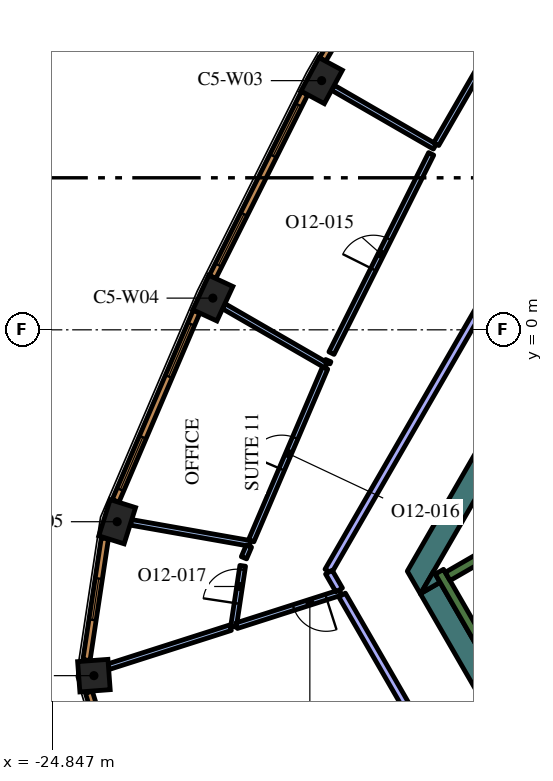
"""IFC4 building model, lengths in metres.
Left out: names, types, materials, properties, quantities, classifications, styles, units other than length and angle.
Written with IfcOpenShell. Run it as: python <this file> out.ifc"""

import sys

from ifc_helpers import new_model, si_unit, direction, frame, frame_2d, origin, origin_2d, place, context, subcontext, project, spatial, polyline, rectangle, outline, extrude, element, fill, save


model = new_model("IFC4")
c1 = context("Model", 3, precision=1e-05, world=origin(), true_north=direction((0.0, 1.0)))
c2 = subcontext(c1, "Body", "Model", "MODEL_VIEW")
j1 = project(units=[si_unit("LENGTHUNIT", "METRE"), si_unit("PLANEANGLEUNIT", "RADIAN")], contexts=[c1])
p1 = place(None, origin())
s1 = spatial("IfcSite", under=j1, at=p1, CompositionType="ELEMENT")
p2 = place(p1, origin())
s2 = spatial("IfcBuilding", under=s1, at=p2, CompositionType="ELEMENT")
p3 = place(p2, frame((0.0, 0.0, 283.8)))
s3 = spatial("IfcBuildingStorey", under=s2, at=p3, CompositionType="ELEMENT", Elevation=283.8)
for number, where, z_axis, x_axis in (
    (1, (-17.756, 6.557, 0.0), (0.0, 0.0, 1.0), (-0.474, -0.881, 0.0)),
    (2, (-20.619, 0.834, 0.0), (0.0, 0.0, 1.0), (-0.421, -0.907, 0.0)),
    (3, (-23.136, -5.049, 0.0), (0.0, 0.0, 1.0), (-0.3, -0.954, 0.0)),
):
    element("IfcColumn", number, at=place(p3, frame(where, z_axis=z_axis, x_axis=x_axis)), inside=s3, PredefinedType="COLUMN", context=c2, shape_type="SweptSolid", body=[
        extrude(rectangle(XDim=1.0, YDim=0.7, at=origin_2d()), origin(), (0.0, 0.0, 1.0), 4.2),
    ])
p4 = place(p3, frame((-23.748, -9.1, 0.0), z_axis=(0.0, 0.0, 1.0), x_axis=(0.074510546573, -0.997220225652, 0.0)))
e4 = element("IfcColumn", 4, at=p4, inside=s3, PredefinedType="COLUMN", context=c2, shape_type="SweptSolid", body=[
    extrude(rectangle(XDim=0.8, YDim=0.8, at=origin_2d()), origin(), (0.0, 0.0, 1.0), 4.2),
])
p5 = place(p3, origin())
e5 = element("IfcWall", 5, at=p5, inside=s3, PredefinedType="SOLIDWALL", context=c2, shape_type="SweptSolid", body=[
    extrude(outline(polyline([(-15.502, -6.35), (-4.912, 11.992), (-4.393, 11.692), (-10.815, 0.569), (-10.84, 0.583), (-10.84, 0.583), (-10.84, 0.583), (-10.965, 0.367), (-10.965, 0.367), (-10.965, 0.367), (-10.94, 0.352), (-11.033, 0.191), (-14.809, -6.35), (-15.156, -6.95), (-15.502, -6.35)])), origin(), (0.0, 0.0, 1.0), 4.2),
])
p6 = place(p3, frame((-14.899, -6.795, 0.0), z_axis=(0.0, 0.0, 1.0), x_axis=(0.499950938802, -0.866053727428, 0.0)))
e6 = element("IfcWall", 6, at=p6, inside=s3, PredefinedType="SOLIDWALL", context=c2, shape_type="SweptSolid", body=[
    extrude(rectangle(XDim=3.823, YDim=0.6, at=frame_2d((1.912, 0.0))), origin(), (0.0, 0.0, 1.0), 4.2),
])
e7 = element("IfcWall", 7, at=p5, inside=s3, PredefinedType="SOLIDWALL", context=c2, shape_type="SweptSolid", body=[
    extrude(outline(polyline([(-14.64, -6.643), (-15.147, -6.936), (-14.809, -6.35), (-14.64, -6.643)])), origin(), (0.0, 0.0, 1.0), 4.2),
])
p7 = place(p3, frame((-12.84, -9.511, 0.0), z_axis=(0.0, 0.0, 1.0), x_axis=(-0.499997733992, 0.866026712061, 0.0)))
e8 = element("IfcWall", 8, at=p7, inside=s3, PredefinedType="SOLIDWALL", context=c2, shape_type="SweptSolid", body=[
    extrude(rectangle(XDim=3.634, YDim=0.25, at=frame_2d((1.817, 0.0))), origin(), (0.0, 0.0, 1.0), 4.2),
])
p8 = place(p3, frame((-14.44, -6.49, 0.0), z_axis=(0.0, 0.0, 1.0), x_axis=(0.866022966069, 0.500004222222, 0.0)))
e9 = element("IfcWall", 9, at=p8, inside=s3, PredefinedType="SOLIDWALL", context=c2, shape_type="SweptSolid", body=[
    extrude(rectangle(XDim=6.8, YDim=0.25, at=frame_2d((3.4, 0.0))), origin(), (0.0, 0.0, 1.0), 4.2),
])
p9 = place(p3, frame((-14.777, 4.822, 0.0), z_axis=(0.0, 0.0, 1.0), x_axis=(-0.865992557167, 0.500056887695, 0.0)))
e10 = element("IfcWall", 10, at=p9, inside=s3, PredefinedType="PARTITIONING", context=c2, shape_type="SweptSolid", body=[
    extrude(rectangle(XDim=3.096, YDim=0.15, at=frame_2d((1.548, 0.0))), origin(), (0.0, 0.0, 1.0), 3.55),
])
p10 = place(p3, frame((-14.74, 4.887, 0.0), z_axis=(0.0, 0.0, 1.0), x_axis=(0.500007141444, 0.86602128063, 0.0)))
e11 = element("IfcWall", 11, at=p10, inside=s3, PredefinedType="PARTITIONING", context=c2, shape_type="SweptSolid", body=[
    extrude(rectangle(XDim=6.137, YDim=0.15, at=frame_2d((3.068, 0.0))), origin(), (0.0, 0.0, 1.0), 3.55),
])
p11 = place(p10, frame((2.637, 0.0, 0.0)))
e12 = element("IfcOpeningElement", 12, at=p11, cuts=e11, PredefinedType="OPENING", context=c2, shape_type="SweptSolid", body=[
    extrude(rectangle(XDim=0.9, YDim=2.1, at=frame_2d((0.45, 1.05))), frame((0.0, 0.085, 0.0), z_axis=(0.0, -1.0, 0.0), x_axis=(1.0, 0.0, 0.0)), (0.0, 0.0, 1.0), 0.17),
])
p12 = place(p3, frame((-17.635, -0.936, 0.0), z_axis=(0.0, 0.0, 1.0), x_axis=(-0.866044607523, 0.499966736674, 0.0)))
e13 = element("IfcWall", 13, at=p12, inside=s3, PredefinedType="PARTITIONING", context=c2, shape_type="SweptSolid", body=[
    extrude(rectangle(XDim=3.115, YDim=0.15, at=frame_2d((1.557, 0.0))), origin(), (0.0, 0.0, 1.0), 3.55),
])
p13 = place(p3, frame((-17.497, -0.613, 0.0), z_axis=(0.0, 0.0, 1.0), x_axis=(0.447480081559, 0.89429389834, 0.0)))
e14 = element("IfcWall", 14, at=p13, inside=s3, PredefinedType="PARTITIONING", context=c2, shape_type="SweptSolid", body=[
    extrude(rectangle(XDim=5.863, YDim=0.15, at=frame_2d((2.931, 0.0))), origin(), (0.0, 0.0, 1.0), 3.55),
])
p14 = place(p13, frame((2.463, 0.0, 0.0)))
e15 = element("IfcOpeningElement", 15, at=p14, cuts=e14, PredefinedType="OPENING", context=c2, shape_type="SweptSolid", body=[
    extrude(rectangle(XDim=0.9, YDim=2.1, at=frame_2d((0.45, 1.05))), frame((0.0, 0.085, 0.0), z_axis=(0.0, -1.0, 0.0), x_axis=(1.0, 0.0, 0.0)), (0.0, 0.0, 1.0), 0.17),
])
p15 = place(p3, frame((-17.581, -0.81, 0.0), z_axis=(0.0, 0.0, 1.0), x_axis=(-0.390033474923, -0.92080067791, 0.0)))
e16 = element("IfcWall", 16, at=p15, inside=s3, PredefinedType="PARTITIONING", context=c2, shape_type="SweptSolid", body=[
    extrude(rectangle(XDim=0.061, YDim=0.15, at=frame_2d((0.03, 0.0))), origin(), (0.0, 0.0, 1.0), 3.55),
])
p16 = place(p3, frame((-19.639, -5.62, 0.0), z_axis=(0.0, 0.0, 1.0), x_axis=(-0.984765028635, 0.173890305586, 0.0)))
e17 = element("IfcWall", 17, at=p16, inside=s3, PredefinedType="PARTITIONING", context=c2, shape_type="SweptSolid", body=[
    extrude(rectangle(XDim=3.184, YDim=0.15, at=frame_2d((1.592, 0.0))), origin(), (0.0, 0.0, 1.0), 3.55),
])
p17 = place(p3, frame((-19.608, -5.549, 0.0), z_axis=(0.0, 0.0, 1.0), x_axis=(0.393352855097, 0.919387584964, 0.0)))
e18 = element("IfcWall", 18, at=p17, inside=s3, PredefinedType="PARTITIONING", context=c2, shape_type="SweptSolid", body=[
    extrude(rectangle(XDim=4.942, YDim=0.15, at=frame_2d((2.471, 0.0))), origin(), (0.0, 0.0, 1.0), 3.55),
])
p18 = place(p17, frame((2.042, 0.0, 0.0)))
e19 = element("IfcOpeningElement", 19, at=p18, cuts=e18, PredefinedType="OPENING", context=c2, shape_type="SweptSolid", body=[
    extrude(rectangle(XDim=0.9, YDim=2.1, at=frame_2d((0.45, 1.05))), frame((0.0, 0.085, 0.0), z_axis=(0.0, -1.0, 0.0), x_axis=(1.0, 0.0, 0.0)), (0.0, 0.0, 1.0), 0.17),
])
p19 = place(p3, frame((-19.669, -5.69, 0.0), z_axis=(0.0, 0.0, 1.0), x_axis=(-0.393566769146, -0.919296034052, 0.0)))
e20 = element("IfcWall", 20, at=p19, inside=s3, PredefinedType="PARTITIONING", context=c2, shape_type="SweptSolid", body=[
    extrude(rectangle(XDim=0.334, YDim=0.15, at=frame_2d((0.167, 0.0))), origin(), (0.0, 0.0, 1.0), 3.55),
])
p20 = place(p3, frame((-20.074, -7.812, 0.0), z_axis=(0.0, 0.0, 1.0), x_axis=(0.149305499664, 0.988791114326, 0.0)))
e21 = element("IfcWall", 21, at=p20, inside=s3, PredefinedType="PARTITIONING", context=c2, shape_type="SweptSolid", body=[
    extrude(rectangle(XDim=1.62, YDim=0.15, at=frame_2d((0.81, 0.0))), origin(), (0.0, 0.0, 1.0), 3.55),
])
p21 = place(p20, frame((0.621, 0.0, 0.0)))
e22 = element("IfcOpeningElement", 22, at=p21, cuts=e21, PredefinedType="OPENING", context=c2, shape_type="SweptSolid", body=[
    extrude(rectangle(XDim=0.9, YDim=2.1, at=frame_2d((0.45, 1.05))), frame((0.0, 0.085, 0.0), z_axis=(0.0, -1.0, 0.0), x_axis=(1.0, 0.0, 0.0)), (0.0, 0.0, 1.0), 0.17),
])
p22 = place(p3, frame((-20.154, -7.838, 0.0), z_axis=(0.0, 0.0, 1.0), x_axis=(-0.952501497002, -0.304533903217, 0.0)))
e23 = element("IfcWall", 23, at=p22, inside=s3, PredefinedType="PARTITIONING", context=c2, shape_type="SweptSolid", body=[
    extrude(rectangle(XDim=3.37, YDim=0.15, at=frame_2d((1.685, 0.0))), origin(), (0.0, 0.0, 1.0), 3.55),
])
p23 = place(p3, frame((-17.256, -6.911, 0.0), z_axis=(0.0, 0.0, 1.0), x_axis=(-0.95247639241, -0.304612412587, 0.0)))
e24 = element("IfcWall", 24, at=p23, inside=s3, PredefinedType="PARTITIONING", context=c2, shape_type="SweptSolid", body=[
    extrude(rectangle(XDim=2.875, YDim=0.15, at=frame_2d((1.438, 0.0))), origin(), (0.0, 0.0, 1.0), 3.55),
])
p24 = place(p23, frame((0.4, 0.0, 0.0)))
e25 = element("IfcOpeningElement", 25, at=p24, cuts=e24, PredefinedType="OPENING", context=c2, shape_type="SweptSolid", body=[
    extrude(rectangle(XDim=0.9, YDim=2.1, at=frame_2d((0.45, 1.05))), frame((0.0, 0.085, 0.0), z_axis=(0.0, -1.0, 0.0), x_axis=(1.0, 0.0, 0.0)), (0.0, 0.0, 1.0), 0.17),
])
p25 = place(p3, frame((-13.451, 0.803, 0.0), z_axis=(0.0, 0.0, 1.0), x_axis=(-0.499982585408, -0.86603545787, 0.0)))
e26 = element("IfcWall", 26, at=p25, inside=s3, PredefinedType="PARTITIONING", context=c2, shape_type="SweptSolid", body=[
    extrude(rectangle(XDim=8.26, YDim=0.2, at=frame_2d((4.13, 0.0))), origin(), (0.0, 0.0, 1.0), 3.55),
])
p26 = place(p3, frame((-17.565, -6.376, 0.0), z_axis=(0.0, 0.0, 1.0), x_axis=(0.499683376352, -0.866208129376, 0.0)))
e27 = element("IfcWall", 27, at=p26, inside=s3, PredefinedType="PARTITIONING", context=c2, shape_type="SweptSolid", body=[
    extrude(rectangle(XDim=0.541, YDim=0.2, at=frame_2d((0.271, 0.0))), origin(), (0.0, 0.0, 1.0), 3.55),
])
p27 = place(p3, frame((-17.218, -6.978, 0.0), z_axis=(0.0, 0.0, 1.0), x_axis=(0.500012299885, -0.866018302326, 0.0)))
e28 = element("IfcWall", 28, at=p27, inside=s3, PredefinedType="PARTITIONING", context=c2, shape_type="SweptSolid", body=[
    extrude(rectangle(XDim=5.857, YDim=0.2, at=frame_2d((2.929, 0.0))), origin(), (0.0, 0.0, 1.0), 3.55),
])
p28 = place(p3, frame((-15.025, 11.796, 0.0), z_axis=(0.0, 0.0, 1.0), x_axis=(-0.500024767483, -0.866011103799, 0.0)))
e29 = element("IfcWall", 29, at=p28, inside=s3, PredefinedType="SOLIDWALL", context=c2, shape_type="SweptSolid", body=[
    extrude(rectangle(XDim=5.406, YDim=0.19, at=frame_2d((2.703, 0.0))), origin(), (0.0, 0.0, 1.0), 3.95),
])
p29 = place(p28, frame((0.346, 0.0, 0.6)))
e30 = element("IfcOpeningElement", 30, at=p29, cuts=e29, PredefinedType="OPENING", context=c2, shape_type="SweptSolid", body=[
    extrude(rectangle(XDim=1.5, YDim=2.85, at=frame_2d((0.75, 1.425))), frame((0.0, 0.105, 0.0), z_axis=(0.0, -1.0, 0.0), x_axis=(1.0, 0.0, 0.0)), (0.0, 0.0, 1.0), 0.21),
])
p30 = place(p28, frame((3.559, 0.0, 0.6)))
e31 = element("IfcOpeningElement", 31, at=p30, cuts=e29, PredefinedType="OPENING", context=c2, shape_type="SweptSolid", body=[
    extrude(rectangle(XDim=1.5, YDim=2.85, at=frame_2d((0.75, 1.425))), frame((0.0, 0.105, 0.0), z_axis=(0.0, -1.0, 0.0), x_axis=(1.0, 0.0, 0.0)), (0.0, 0.0, 1.0), 0.21),
])
p31 = place(p3, frame((-18.206, 6.227, 0.0), z_axis=(0.0, 0.0, 1.0), x_axis=(-0.447484531401, -0.894291671747, 0.0)))
e32 = element("IfcWall", 32, at=p31, inside=s3, PredefinedType="SOLIDWALL", context=c2, shape_type="SweptSolid", body=[
    extrude(rectangle(XDim=5.406, YDim=0.19, at=frame_2d((2.703, 0.0))), origin(), (0.0, 0.0, 1.0), 3.95),
])
p32 = place(p31, frame((0.346, 0.0, 0.6)))
e33 = element("IfcOpeningElement", 33, at=p32, cuts=e32, PredefinedType="OPENING", context=c2, shape_type="SweptSolid", body=[
    extrude(rectangle(XDim=1.5, YDim=2.85, at=frame_2d((0.75, 1.425))), frame((0.0, 0.105, 0.0), z_axis=(0.0, -1.0, 0.0), x_axis=(1.0, 0.0, 0.0)), (0.0, 0.0, 1.0), 0.21),
])
p33 = place(p31, frame((3.559, 0.0, 0.6)))
e34 = element("IfcOpeningElement", 34, at=p33, cuts=e32, PredefinedType="OPENING", context=c2, shape_type="SweptSolid", body=[
    extrude(rectangle(XDim=1.5, YDim=2.85, at=frame_2d((0.75, 1.425))), frame((0.0, 0.105, 0.0), z_axis=(0.0, -1.0, 0.0), x_axis=(1.0, 0.0, 0.0)), (0.0, 0.0, 1.0), 0.21),
])
p34 = place(p3, frame((-21.049, 0.478, 0.0), z_axis=(0.0, 0.0, 1.0), x_axis=(-0.393347848476, -0.919389726992, 0.0)))
e35 = element("IfcWall", 35, at=p34, inside=s3, PredefinedType="SOLIDWALL", context=c2, shape_type="SweptSolid", body=[
    extrude(rectangle(XDim=5.415, YDim=0.19, at=frame_2d((2.708, 0.0))), origin(), (0.0, 0.0, 1.0), 3.95),
])
p35 = place(p34, frame((0.357, 0.0, 0.6)))
e36 = element("IfcOpeningElement", 36, at=p35, cuts=e35, PredefinedType="OPENING", context=c2, shape_type="SweptSolid", body=[
    extrude(rectangle(XDim=1.5, YDim=2.85, at=frame_2d((0.75, 1.425))), frame((0.0, 0.105, 0.0), z_axis=(0.0, -1.0, 0.0), x_axis=(1.0, 0.0, 0.0)), (0.0, 0.0, 1.0), 0.21),
])
p36 = place(p34, frame((3.593, 0.0, 0.6)))
e37 = element("IfcOpeningElement", 37, at=p36, cuts=e35, PredefinedType="OPENING", context=c2, shape_type="SweptSolid", body=[
    extrude(rectangle(XDim=1.5, YDim=2.85, at=frame_2d((0.75, 1.425))), frame((0.0, 0.105, 0.0), z_axis=(0.0, -1.0, 0.0), x_axis=(1.0, 0.0, 0.0)), (0.0, 0.0, 1.0), 0.21),
])
p37 = place(p3, frame((-23.46, -5.488, 0.0), z_axis=(0.0, 0.0, 1.0), x_axis=(-0.149421055602, -0.988773658702, 0.0)))
e38 = element("IfcWall", 38, at=p37, inside=s3, PredefinedType="SOLIDWALL", context=c2, shape_type="SweptSolid", body=[
    extrude(rectangle(XDim=3.237, YDim=0.19, at=frame_2d((1.618, 0.0))), origin(), (0.0, 0.0, 1.0), 3.95),
])
p38 = place(p37, frame((1.068, 0.0, 0.6)))
e39 = element("IfcOpeningElement", 39, at=p38, cuts=e38, PredefinedType="OPENING", context=c2, shape_type="SweptSolid", body=[
    extrude(rectangle(XDim=1.1, YDim=2.85, at=frame_2d((0.55, 1.425))), frame((0.0, 0.105, 0.0), z_axis=(0.0, -1.0, 0.0), x_axis=(1.0, 0.0, 0.0)), (0.0, 0.0, 1.0), 0.21),
])
p39 = place(p3, frame((-23.881, -9.535, 0.0), z_axis=(0.0, 0.0, 1.0), x_axis=(0.294706210429, -0.9555879078, 0.0)))
e40 = element("IfcWall", 40, at=p39, inside=s3, PredefinedType="SOLIDWALL", context=c2, shape_type="SweptSolid", body=[
    extrude(rectangle(XDim=2.627, YDim=0.19, at=frame_2d((1.313, 0.0))), origin(), (0.0, 0.0, 1.0), 3.95),
])
p40 = place(p39, frame((0.763, 0.0, 0.6)))
e41 = element("IfcOpeningElement", 41, at=p40, cuts=e40, PredefinedType="OPENING", context=c2, shape_type="SweptSolid", body=[
    extrude(rectangle(XDim=1.1, YDim=2.85, at=frame_2d((0.55, 1.425))), frame((0.0, 0.105, 0.0), z_axis=(0.0, -1.0, 0.0), x_axis=(1.0, 0.0, 0.0)), (0.0, 0.0, 1.0), 0.21),
])
p41 = place(p14, origin())
e42 = element("IfcDoor", 42, at=p41, inside=s3, OperationType="SINGLE_SWING_LEFT", PredefinedType="DOOR", context=c2, shape_type="SweptSolid", body=[
    extrude(rectangle(XDim=0.9, YDim=2.1, at=frame_2d((0.45, 1.05))), frame((0.0, 0.025, 0.0), z_axis=(0.0, -1.0, 0.0), x_axis=(1.0, 0.0, 0.0)), (0.0, 0.0, 1.0), 0.05),
])
fill(e15, e42)
p42 = place(p18, origin())
e43 = element("IfcDoor", 43, at=p42, inside=s3, OperationType="SINGLE_SWING_RIGHT", PredefinedType="DOOR", context=c2, shape_type="SweptSolid", body=[
    extrude(rectangle(XDim=0.9, YDim=2.1, at=frame_2d((0.45, 1.05))), frame((0.0, 0.025, 0.0), z_axis=(0.0, -1.0, 0.0), x_axis=(1.0, 0.0, 0.0)), (0.0, 0.0, 1.0), 0.05),
])
fill(e19, e43)
p43 = place(p21, origin())
e44 = element("IfcDoor", 44, at=p43, inside=s3, OperationType="SINGLE_SWING_RIGHT", PredefinedType="DOOR", context=c2, shape_type="SweptSolid", body=[
    extrude(rectangle(XDim=0.9, YDim=2.1, at=frame_2d((0.45, 1.05))), frame((0.0, 0.025, 0.0), z_axis=(0.0, -1.0, 0.0), x_axis=(1.0, 0.0, 0.0)), (0.0, 0.0, 1.0), 0.05),
])
fill(e22, e44)
p44 = place(p24, origin())
e45 = element("IfcDoor", 45, at=p44, inside=s3, OperationType="SINGLE_SWING_LEFT", PredefinedType="DOOR", context=c2, shape_type="SweptSolid", body=[
    extrude(rectangle(XDim=0.9, YDim=2.1, at=frame_2d((0.45, 1.05))), frame((0.0, 0.025, 0.0), z_axis=(0.0, -1.0, 0.0), x_axis=(1.0, 0.0, 0.0)), (0.0, 0.0, 1.0), 0.05),
])
fill(e25, e45)
p45 = place(p32, origin())
e46 = element("IfcWindow", 46, at=p45, inside=s3, PartitioningType="SINGLE_PANEL", PredefinedType="WINDOW", context=c2, shape_type="SweptSolid", body=[
    extrude(rectangle(XDim=1.5, YDim=2.85, at=frame_2d((0.75, 1.425))), frame((0.0, 0.045, 0.0), z_axis=(0.0, -1.0, 0.0), x_axis=(1.0, 0.0, 0.0)), (0.0, 0.0, 1.0), 0.06),
])
fill(e33, e46)
p46 = place(p33, origin())
e47 = element("IfcWindow", 47, at=p46, inside=s3, PartitioningType="SINGLE_PANEL", PredefinedType="WINDOW", context=c2, shape_type="SweptSolid", body=[
    extrude(rectangle(XDim=1.5, YDim=2.85, at=frame_2d((0.75, 1.425))), frame((0.0, 0.045, 0.0), z_axis=(0.0, -1.0, 0.0), x_axis=(1.0, 0.0, 0.0)), (0.0, 0.0, 1.0), 0.06),
])
fill(e34, e47)
p47 = place(p35, origin())
e48 = element("IfcWindow", 48, at=p47, inside=s3, PartitioningType="SINGLE_PANEL", PredefinedType="WINDOW", context=c2, shape_type="SweptSolid", body=[
    extrude(rectangle(XDim=1.5, YDim=2.85, at=frame_2d((0.75, 1.425))), frame((0.0, 0.045, 0.0), z_axis=(0.0, -1.0, 0.0), x_axis=(1.0, 0.0, 0.0)), (0.0, 0.0, 1.0), 0.06),
])
fill(e36, e48)
p48 = place(p36, origin())
e49 = element("IfcWindow", 49, at=p48, inside=s3, PartitioningType="SINGLE_PANEL", PredefinedType="WINDOW", context=c2, shape_type="SweptSolid", body=[
    extrude(rectangle(XDim=1.5, YDim=2.85, at=frame_2d((0.75, 1.425))), frame((0.0, 0.045, 0.0), z_axis=(0.0, -1.0, 0.0), x_axis=(1.0, 0.0, 0.0)), (0.0, 0.0, 1.0), 0.06),
])
fill(e37, e49)
p49 = place(p38, origin())
e50 = element("IfcWindow", 50, at=p49, inside=s3, PartitioningType="SINGLE_PANEL", PredefinedType="WINDOW", context=c2, shape_type="SweptSolid", body=[
    extrude(rectangle(XDim=1.1, YDim=2.85, at=frame_2d((0.55, 1.425))), frame((0.0, 0.045, 0.0), z_axis=(0.0, -1.0, 0.0), x_axis=(1.0, 0.0, 0.0)), (0.0, 0.0, 1.0), 0.06),
])
fill(e39, e50)
save(model, sys.argv[1])
